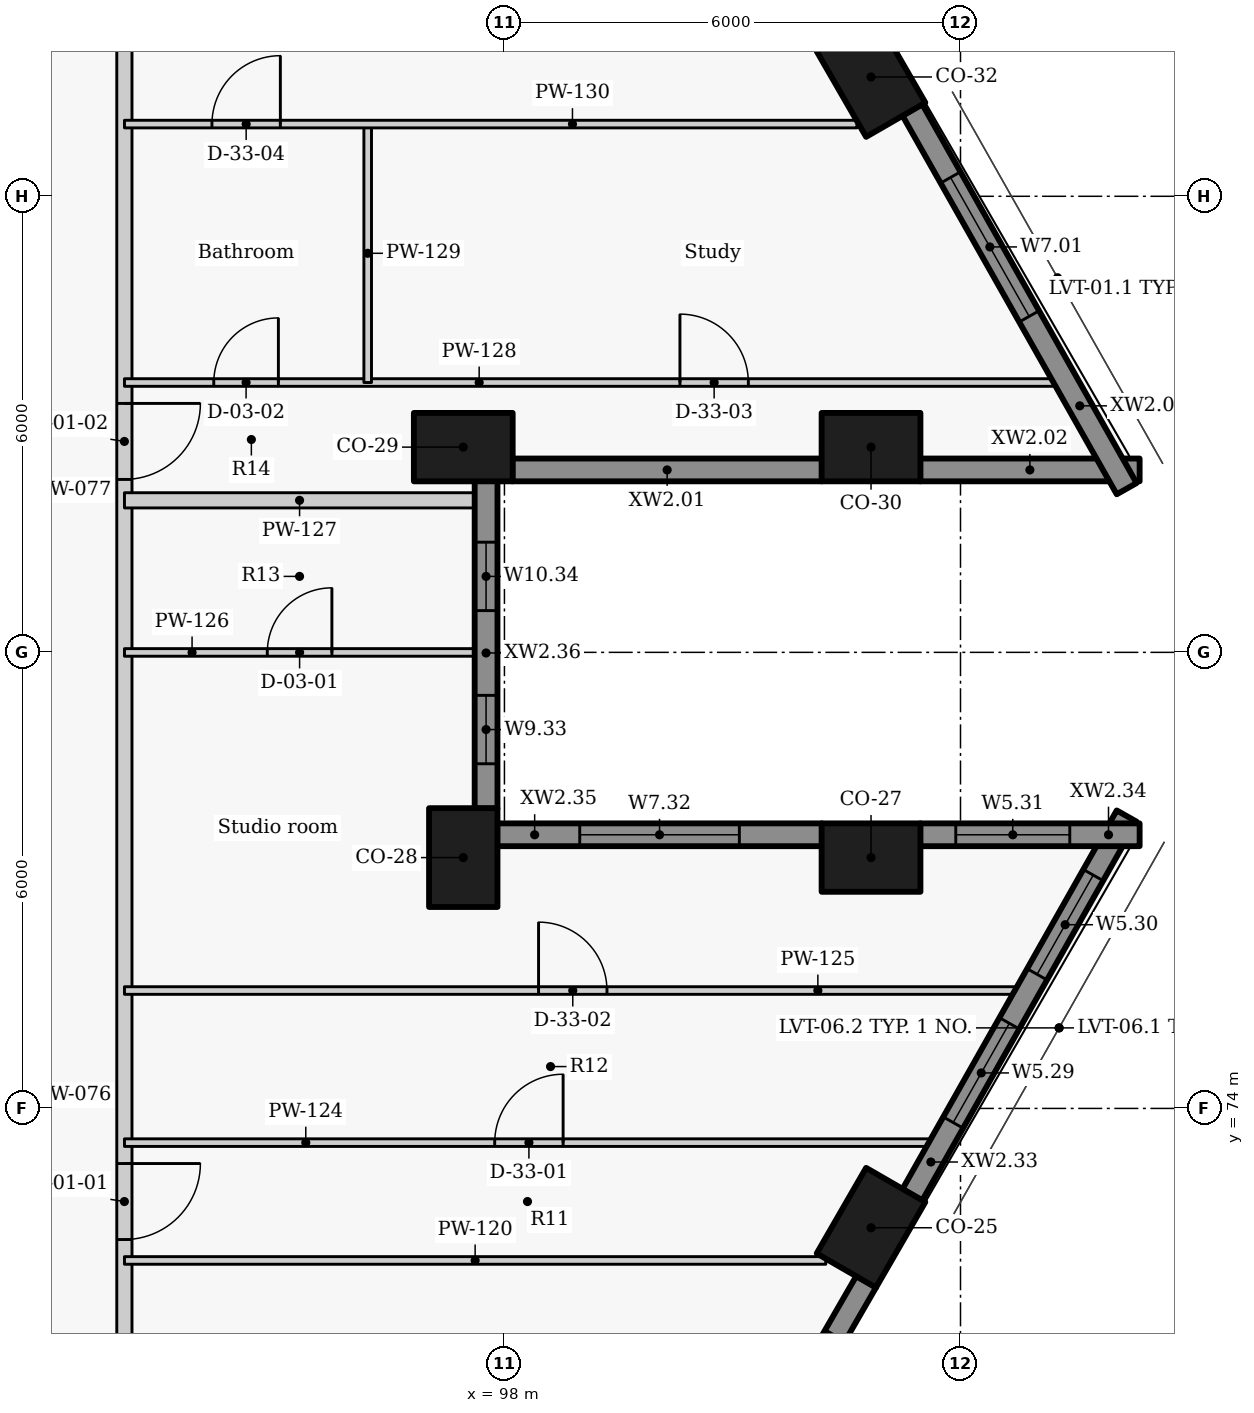
"""IFC4 building model, lengths in metres.
Left out: names, types, materials, properties, quantities, classifications, styles, units other than length and angle.
Written with IfcOpenShell. Run it as: python <this file> out.ifc"""

import sys

from ifc_helpers import new_model, si_unit, direction, frame, frame_2d, origin, origin_2d, place, context, subcontext, project, spatial, rectangle, extrude, element, fill, save


model = new_model("IFC4")
c1 = context("Model", 3, precision=1e-05, world=origin(), true_north=direction((0.0, 1.0)))
c2 = subcontext(c1, "Body", "Model", "MODEL_VIEW")
j1 = project(units=[si_unit("LENGTHUNIT", "METRE"), si_unit("PLANEANGLEUNIT", "RADIAN")], contexts=[c1])
p1 = place(None, origin())
s1 = spatial("IfcSite", under=j1, at=p1, CompositionType="ELEMENT")
p2 = place(p1, origin())
s2 = spatial("IfcBuilding", under=s1, at=p2, CompositionType="ELEMENT")
p3 = place(p2, frame((0.0, 0.0, 160.2)))
s3 = spatial("IfcBuildingStorey", under=s2, at=p3, CompositionType="ELEMENT", Elevation=160.2)
for number, where, z_axis, x_axis in (
    (1, (102.823, 72.43, 0.0), (0.0, 0.0, 1.0), (0.5, 0.866, 0.0)),
    (2, (102.823, 77.3, 0.0), (0.0, 0.0, 1.0), (-1.0, 0.0, 0.0)),
    (3, (97.458, 77.3, 0.0), (0.0, 0.0, 1.0), (0.0, 1.0, 0.0)),
    (4, (97.458, 82.7, 0.0), (0.0, 0.0, 1.0), (1.0, 0.0, 0.0)),
    (5, (102.823, 82.7, 0.0), (0.0, 0.0, 1.0), (1.0, 0.0, 0.0)),
    (6, (102.823, 87.57, 0.0), (0.0, 0.0, 1.0), (-0.5, 0.866, 0.0)),
):
    element("IfcColumn", number, at=place(p3, frame(where, z_axis=z_axis, x_axis=x_axis)), inside=s3, PredefinedType="COLUMN", context=c2, shape_type="SweptSolid", body=[
        extrude(rectangle(XDim=1.3, YDim=0.9, at=origin_2d()), origin(), (0.0, 0.0, 1.0), 3.3),
    ])
p4 = place(p3, frame((98.104, 82.4, 0.0), z_axis=(0.0, 0.0, 1.0), x_axis=(1.0, 0.0, 0.0)))
e7 = element("IfcWall", 7, at=p4, inside=s3, PredefinedType="SOLIDWALL", context=c2, shape_type="SweptSolid", body=[
    extrude(rectangle(XDim=4.073, YDim=0.3, at=frame_2d((2.036, 0.0))), origin(), (0.0, 0.0, 1.0), 2.425),
])
p5 = place(p3, frame((103.469, 82.4, 0.0), z_axis=(0.0, 0.0, 1.0), x_axis=(1.0, 0.0, 0.0)))
e8 = element("IfcWall", 8, at=p5, inside=s3, PredefinedType="SOLIDWALL", context=c2, shape_type="SweptSolid", body=[
    extrude(rectangle(XDim=2.888, YDim=0.3, at=frame_2d((1.444, 0.0))), origin(), (0.0, 0.0, 1.0), 2.425),
])
p6 = place(p3, frame((106.186, 82.153, 0.0), z_axis=(0.0, 0.0, 1.0), x_axis=(-0.492498306264, 0.87031340236, 0.0)))
e9 = element("IfcWall", 9, at=p6, inside=s3, PredefinedType="SOLIDWALL", context=c2, shape_type="SweptSolid", body=[
    extrude(rectangle(XDim=5.727, YDim=0.3, at=frame_2d((2.863, 0.0))), origin(), (0.0, 0.0, 1.0), 2.425),
])
p7 = place(p6, frame((2.604, 0.0, 0.9)))
e10 = element("IfcOpeningElement", 10, at=p7, cuts=e9, PredefinedType="OPENING", context=c2, shape_type="SweptSolid", body=[
    extrude(rectangle(XDim=2.1, YDim=1.1, at=frame_2d((1.05, 0.55))), frame((0.0, 0.16, 0.0), z_axis=(0.0, -1.0, 0.0), x_axis=(1.0, 0.0, 0.0)), (0.0, 0.0, 1.0), 0.32),
])
p8 = place(p3, frame((100.891, 68.485, 0.0), z_axis=(0.0, 0.0, 1.0), x_axis=(0.499933594891, 0.866063739398, 0.0)))
e11 = element("IfcWall", 11, at=p8, inside=s3, PredefinedType="SOLIDWALL", context=c2, shape_type="SweptSolid", body=[
    extrude(rectangle(XDim=3.737, YDim=0.3, at=frame_2d((1.868, 0.0))), origin(), (0.0, 0.0, 1.0), 2.425),
])
p9 = place(p8, frame((0.818, 0.0, 0.9)))
e12 = element("IfcOpeningElement", 12, at=p9, cuts=e11, PredefinedType="OPENING", context=c2, shape_type="SweptSolid", body=[
    extrude(rectangle(XDim=2.1, YDim=1.1, at=frame_2d((1.05, 0.55))), frame((0.0, 0.16, 0.0), z_axis=(0.0, -1.0, 0.0), x_axis=(1.0, 0.0, 0.0)), (0.0, 0.0, 1.0), 0.32),
])
p10 = place(p3, frame((103.366, 72.863, 0.0), z_axis=(0.0, 0.0, 1.0), x_axis=(0.492498306264, 0.87031340236, 0.0)))
e13 = element("IfcWall", 13, at=p10, inside=s3, PredefinedType="SOLIDWALL", context=c2, shape_type="SweptSolid", body=[
    extrude(rectangle(XDim=5.727, YDim=0.3, at=frame_2d((2.863, 0.0))), origin(), (0.0, 0.0, 1.0), 2.425),
])
p11 = place(p10, frame((1.093, 0.0, 0.9)))
e14 = element("IfcOpeningElement", 14, at=p11, cuts=e13, PredefinedType="OPENING", context=c2, shape_type="SweptSolid", body=[
    extrude(rectangle(XDim=1.5, YDim=1.1, at=frame_2d((0.75, 0.55))), frame((0.0, 0.16, 0.0), z_axis=(0.0, -1.0, 0.0), x_axis=(1.0, 0.0, 0.0)), (0.0, 0.0, 1.0), 0.32),
])
p12 = place(p10, frame((3.334, 0.0, 0.9)))
e15 = element("IfcOpeningElement", 15, at=p12, cuts=e13, PredefinedType="OPENING", context=c2, shape_type="SweptSolid", body=[
    extrude(rectangle(XDim=1.5, YDim=1.1, at=frame_2d((0.75, 0.55))), frame((0.0, 0.16, 0.0), z_axis=(0.0, -1.0, 0.0), x_axis=(1.0, 0.0, 0.0)), (0.0, 0.0, 1.0), 0.32),
])
p13 = place(p3, frame((106.357, 77.6, 0.0), z_axis=(0.0, 0.0, 1.0), x_axis=(-1.0, 0.0, 0.0)))
e16 = element("IfcWall", 16, at=p13, inside=s3, PredefinedType="SOLIDWALL", context=c2, shape_type="SweptSolid", body=[
    extrude(rectangle(XDim=2.888, YDim=0.3, at=frame_2d((1.444, 0.0))), origin(), (0.0, 0.0, 1.0), 2.425),
])
p14 = place(p13, frame((0.919, 0.0, 0.9)))
e17 = element("IfcOpeningElement", 17, at=p14, cuts=e16, PredefinedType="OPENING", context=c2, shape_type="SweptSolid", body=[
    extrude(rectangle(XDim=1.5, YDim=1.1, at=frame_2d((0.75, 0.55))), frame((0.0, 0.16, 0.0), z_axis=(0.0, -1.0, 0.0), x_axis=(1.0, 0.0, 0.0)), (0.0, 0.0, 1.0), 0.32),
])
p15 = place(p3, frame((102.177, 77.6, 0.0), z_axis=(0.0, 0.0, 1.0), x_axis=(-1.0, 0.0, 0.0)))
e18 = element("IfcWall", 18, at=p15, inside=s3, PredefinedType="SOLIDWALL", context=c2, shape_type="SweptSolid", body=[
    extrude(rectangle(XDim=4.273, YDim=0.3, at=frame_2d((2.136, 0.0))), origin(), (0.0, 0.0, 1.0), 2.425),
])
p16 = place(p15, frame((1.086, 0.0, 0.9)))
e19 = element("IfcOpeningElement", 19, at=p16, cuts=e18, PredefinedType="OPENING", context=c2, shape_type="SweptSolid", body=[
    extrude(rectangle(XDim=2.1, YDim=1.1, at=frame_2d((1.05, 0.55))), frame((0.0, 0.16, 0.0), z_axis=(0.0, -1.0, 0.0), x_axis=(1.0, 0.0, 0.0)), (0.0, 0.0, 1.0), 0.32),
])
p17 = place(p3, frame((97.758, 77.946, 0.0), z_axis=(0.0, 0.0, 1.0), x_axis=(0.0, 1.0, 0.0)))
e20 = element("IfcWall", 20, at=p17, inside=s3, PredefinedType="SOLIDWALL", context=c2, shape_type="SweptSolid", body=[
    extrude(rectangle(XDim=4.308, YDim=0.3, at=frame_2d((2.154, 0.0))), origin(), (0.0, 0.0, 1.0), 2.425),
])
p18 = place(p17, frame((0.588, 0.0, 0.9)))
e21 = element("IfcOpeningElement", 21, at=p18, cuts=e20, PredefinedType="OPENING", context=c2, shape_type="SweptSolid", body=[
    extrude(rectangle(XDim=0.9, YDim=1.1, at=frame_2d((0.45, 0.55))), frame((0.0, 0.16, 0.0), z_axis=(0.0, -1.0, 0.0), x_axis=(1.0, 0.0, 0.0)), (0.0, 0.0, 1.0), 0.32),
])
p19 = place(p17, frame((2.603, 0.0, 1.5)))
e22 = element("IfcOpeningElement", 22, at=p19, cuts=e20, PredefinedType="OPENING", context=c2, shape_type="SweptSolid", body=[
    extrude(rectangle(XDim=0.9, YDim=0.5, at=frame_2d((0.45, 0.25))), frame((0.0, 0.16, 0.0), z_axis=(0.0, -1.0, 0.0), x_axis=(1.0, 0.0, 0.0)), (0.0, 0.0, 1.0), 0.32),
])
p20 = place(p3, frame((93.0, 102.498, 0.0), z_axis=(0.0, 0.0, 1.0), x_axis=(0.0, -1.0, 0.0)))
e23 = element("IfcWall", 23, at=p20, inside=s3, PredefinedType="PARTITIONING", context=c2, shape_type="SweptSolid", body=[
    extrude(rectangle(XDim=45.665, YDim=0.2, at=frame_2d((22.833, 0.0))), origin(), (0.0, 0.0, 1.0), 2.405),
])
p21 = place(p20, frame((37.581, 0.0, 0.0)))
e24 = element("IfcOpeningElement", 24, at=p21, cuts=e23, PredefinedType="OPENING", context=c2, shape_type="SweptSolid", body=[
    extrude(rectangle(XDim=1.0, YDim=2.1, at=frame_2d((0.5, 1.05))), frame((0.0, 0.11, 0.0), z_axis=(0.0, -1.0, 0.0), x_axis=(1.0, 0.0, 0.0)), (0.0, 0.0, 1.0), 0.22),
])
p22 = place(p20, frame((29.223, 0.0, 0.0)))
e25 = element("IfcOpeningElement", 25, at=p22, cuts=e23, PredefinedType="OPENING", context=c2, shape_type="SweptSolid", body=[
    extrude(rectangle(XDim=1.0, YDim=2.1, at=frame_2d((0.5, 1.05))), frame((0.0, 0.11, 0.0), z_axis=(0.0, -1.0, 0.0), x_axis=(1.0, 0.0, 0.0)), (0.0, 0.0, 1.0), 0.22),
])
p23 = place(p20, frame((19.223, 0.0, 0.0)))
e26 = element("IfcOpeningElement", 26, at=p23, cuts=e23, PredefinedType="OPENING", context=c2, shape_type="SweptSolid", body=[
    extrude(rectangle(XDim=1.0, YDim=2.1, at=frame_2d((0.5, 1.05))), frame((0.0, 0.11, 0.0), z_axis=(0.0, -1.0, 0.0), x_axis=(1.0, 0.0, 0.0)), (0.0, 0.0, 1.0), 0.22),
])
p24 = place(p3, frame((93.001, 72.0, 0.0), z_axis=(0.0, 0.0, 1.0), x_axis=(1.0, 0.0, 0.0)))
e27 = element("IfcWall", 27, at=p24, inside=s3, PredefinedType="PARTITIONING", context=c2, shape_type="SweptSolid", body=[
    extrude(rectangle(XDim=9.227, YDim=0.1, at=frame_2d((4.614, 0.0))), origin(), (0.0, 0.0, 1.0), 3.025),
])
p25 = place(p3, frame((93.001, 73.55, 0.0), z_axis=(0.0, 0.0, 1.0), x_axis=(1.0, 0.0, 0.0)))
e28 = element("IfcWall", 28, at=p25, inside=s3, PredefinedType="PARTITIONING", context=c2, shape_type="SweptSolid", body=[
    extrude(rectangle(XDim=10.642, YDim=0.1, at=frame_2d((5.321, 0.0))), origin(), (0.0, 0.0, 1.0), 2.405),
])
p26 = place(p25, frame((4.871, 0.0, 0.0)))
e29 = element("IfcOpeningElement", 29, at=p26, cuts=e28, PredefinedType="OPENING", context=c2, shape_type="SweptSolid", body=[
    extrude(rectangle(XDim=0.9, YDim=2.1, at=frame_2d((0.45, 1.05))), frame((0.0, 0.06, 0.0), z_axis=(0.0, -1.0, 0.0), x_axis=(1.0, 0.0, 0.0)), (0.0, 0.0, 1.0), 0.12),
])
p27 = place(p3, frame((93.001, 75.551, 0.0), z_axis=(0.0, 0.0, 1.0), x_axis=(1.0, 0.0, 0.0)))
e30 = element("IfcWall", 30, at=p27, inside=s3, PredefinedType="PARTITIONING", context=c2, shape_type="SweptSolid", body=[
    extrude(rectangle(XDim=11.797, YDim=0.1, at=frame_2d((5.898, 0.0))), origin(), (0.0, 0.0, 1.0), 2.405),
])
p28 = place(p27, frame((5.448, 0.0, 0.0)))
e31 = element("IfcOpeningElement", 31, at=p28, cuts=e30, PredefinedType="OPENING", context=c2, shape_type="SweptSolid", body=[
    extrude(rectangle(XDim=0.9, YDim=2.1, at=frame_2d((0.45, 1.05))), frame((0.0, 0.06, 0.0), z_axis=(0.0, -1.0, 0.0), x_axis=(1.0, 0.0, 0.0)), (0.0, 0.0, 1.0), 0.12),
])
p29 = place(p3, frame((93.001, 79.999, 0.0), z_axis=(0.0, 0.0, 1.0), x_axis=(1.0, 0.0, 0.0)))
e32 = element("IfcWall", 32, at=p29, inside=s3, PredefinedType="PARTITIONING", context=c2, shape_type="SweptSolid", body=[
    extrude(rectangle(XDim=4.607, YDim=0.1, at=frame_2d((2.304, 0.0))), origin(), (0.0, 0.0, 1.0), 2.405),
])
p30 = place(p29, frame((1.879, 0.0, 0.0)))
e33 = element("IfcOpeningElement", 33, at=p30, cuts=e32, PredefinedType="OPENING", context=c2, shape_type="SweptSolid", body=[
    extrude(rectangle(XDim=0.85, YDim=2.1, at=frame_2d((0.425, 1.05))), frame((0.0, 0.06, 0.0), z_axis=(0.0, -1.0, 0.0), x_axis=(1.0, 0.0, 0.0)), (0.0, 0.0, 1.0), 0.12),
])
p31 = place(p3, frame((93.001, 82.0, 0.0), z_axis=(0.0, 0.0, 1.0), x_axis=(1.0, 0.0, 0.0)))
e34 = element("IfcWall", 34, at=p31, inside=s3, PredefinedType="PARTITIONING", context=c2, shape_type="SweptSolid", body=[
    extrude(rectangle(XDim=4.607, YDim=0.2, at=frame_2d((2.304, 0.0))), origin(), (0.0, 0.0, 1.0), 2.405),
])
p32 = place(p3, frame((93.001, 83.55, 0.0), z_axis=(0.0, 0.0, 1.0), x_axis=(1.0, 0.0, 0.0)))
e35 = element("IfcWall", 35, at=p32, inside=s3, PredefinedType="PARTITIONING", context=c2, shape_type="SweptSolid", body=[
    extrude(rectangle(XDim=12.316, YDim=0.1, at=frame_2d((6.158, 0.0))), origin(), (0.0, 0.0, 1.0), 2.405),
])
p33 = place(p32, frame((1.175, 0.0, 0.0)))
e36 = element("IfcOpeningElement", 36, at=p33, cuts=e35, PredefinedType="OPENING", context=c2, shape_type="SweptSolid", body=[
    extrude(rectangle(XDim=0.85, YDim=2.1, at=frame_2d((0.425, 1.05))), frame((0.0, 0.06, 0.0), z_axis=(0.0, -1.0, 0.0), x_axis=(1.0, 0.0, 0.0)), (0.0, 0.0, 1.0), 0.12),
])
p34 = place(p32, frame((7.308, 0.0, 0.0)))
e37 = element("IfcOpeningElement", 37, at=p34, cuts=e35, PredefinedType="OPENING", context=c2, shape_type="SweptSolid", body=[
    extrude(rectangle(XDim=0.9, YDim=2.1, at=frame_2d((0.45, 1.05))), frame((0.0, 0.06, 0.0), z_axis=(0.0, -1.0, 0.0), x_axis=(1.0, 0.0, 0.0)), (0.0, 0.0, 1.0), 0.12),
])
p35 = place(p3, frame((96.201, 83.55, 0.0), z_axis=(0.0, 0.0, 1.0), x_axis=(0.0, 1.0, 0.0)))
e38 = element("IfcWall", 38, at=p35, inside=s3, PredefinedType="PARTITIONING", context=c2, shape_type="SweptSolid", body=[
    extrude(rectangle(XDim=3.4, YDim=0.1, at=frame_2d((1.7, 0.0))), origin(), (0.0, 0.0, 1.0), 3.025),
])
p36 = place(p3, frame((93.001, 86.95, 0.0), z_axis=(0.0, 0.0, 1.0), x_axis=(1.0, 0.0, 0.0)))
e39 = element("IfcWall", 39, at=p36, inside=s3, PredefinedType="PARTITIONING", context=c2, shape_type="SweptSolid", body=[
    extrude(rectangle(XDim=9.637, YDim=0.1, at=frame_2d((4.818, 0.0))), origin(), (0.0, 0.0, 1.0), 3.025),
])
p37 = place(p36, frame((1.151, 0.0, 0.0)))
e40 = element("IfcOpeningElement", 40, at=p37, cuts=e39, PredefinedType="OPENING", context=c2, shape_type="SweptSolid", body=[
    extrude(rectangle(XDim=0.9, YDim=2.1, at=frame_2d((0.45, 1.05))), frame((0.0, 0.06, 0.0), z_axis=(0.0, -1.0, 0.0), x_axis=(1.0, 0.0, 0.0)), (0.0, 0.0, 1.0), 0.12),
])
p38 = place(p7, origin())
e41 = element("IfcWindow", 41, at=p38, inside=s3, PartitioningType="SINGLE_PANEL", PredefinedType="WINDOW", context=c2, shape_type="SweptSolid", body=[
    extrude(rectangle(XDim=2.1, YDim=1.1, at=frame_2d((1.05, 0.55))), frame((0.0, 0.03, 0.0), z_axis=(0.0, -1.0, 0.0), x_axis=(1.0, 0.0, 0.0)), (0.0, 0.0, 1.0), 0.06),
])
fill(e10, e41)
p39 = place(p11, origin())
e42 = element("IfcWindow", 42, at=p39, inside=s3, PartitioningType="SINGLE_PANEL", PredefinedType="WINDOW", context=c2, shape_type="SweptSolid", body=[
    extrude(rectangle(XDim=1.5, YDim=1.1, at=frame_2d((0.75, 0.55))), frame((0.0, 0.03, 0.0), z_axis=(0.0, -1.0, 0.0), x_axis=(1.0, 0.0, 0.0)), (0.0, 0.0, 1.0), 0.06),
])
fill(e14, e42)
p40 = place(p12, origin())
e43 = element("IfcWindow", 43, at=p40, inside=s3, PartitioningType="SINGLE_PANEL", PredefinedType="WINDOW", context=c2, shape_type="SweptSolid", body=[
    extrude(rectangle(XDim=1.5, YDim=1.1, at=frame_2d((0.75, 0.55))), frame((0.0, 0.03, 0.0), z_axis=(0.0, -1.0, 0.0), x_axis=(1.0, 0.0, 0.0)), (0.0, 0.0, 1.0), 0.06),
])
fill(e15, e43)
p41 = place(p14, origin())
e44 = element("IfcWindow", 44, at=p41, inside=s3, PartitioningType="SINGLE_PANEL", PredefinedType="WINDOW", context=c2, shape_type="SweptSolid", body=[
    extrude(rectangle(XDim=1.5, YDim=1.1, at=frame_2d((0.75, 0.55))), frame((0.0, 0.03, 0.0), z_axis=(0.0, -1.0, 0.0), x_axis=(1.0, 0.0, 0.0)), (0.0, 0.0, 1.0), 0.06),
])
fill(e17, e44)
p42 = place(p16, origin())
e45 = element("IfcWindow", 45, at=p42, inside=s3, PartitioningType="SINGLE_PANEL", PredefinedType="WINDOW", context=c2, shape_type="SweptSolid", body=[
    extrude(rectangle(XDim=2.1, YDim=1.1, at=frame_2d((1.05, 0.55))), frame((0.0, 0.03, 0.0), z_axis=(0.0, -1.0, 0.0), x_axis=(1.0, 0.0, 0.0)), (0.0, 0.0, 1.0), 0.06),
])
fill(e19, e45)
p43 = place(p18, origin())
e46 = element("IfcWindow", 46, at=p43, inside=s3, PartitioningType="SINGLE_PANEL", PredefinedType="WINDOW", context=c2, shape_type="SweptSolid", body=[
    extrude(rectangle(XDim=0.9, YDim=1.1, at=frame_2d((0.45, 0.55))), frame((0.0, 0.03, 0.0), z_axis=(0.0, -1.0, 0.0), x_axis=(1.0, 0.0, 0.0)), (0.0, 0.0, 1.0), 0.06),
])
fill(e21, e46)
p44 = place(p19, origin())
e47 = element("IfcWindow", 47, at=p44, inside=s3, PartitioningType="SINGLE_PANEL", PredefinedType="WINDOW", context=c2, shape_type="SweptSolid", body=[
    extrude(rectangle(XDim=0.9, YDim=0.5, at=frame_2d((0.45, 0.25))), frame((0.0, 0.03, 0.0), z_axis=(0.0, -1.0, 0.0), x_axis=(1.0, 0.0, 0.0)), (0.0, 0.0, 1.0), 0.06),
])
fill(e22, e47)
p45 = place(p22, origin())
e48 = element("IfcDoor", 48, at=p45, inside=s3, OperationType="SINGLE_SWING_LEFT", PredefinedType="DOOR", context=c2, shape_type="SweptSolid", body=[
    extrude(rectangle(XDim=1.0, YDim=2.1, at=frame_2d((0.5, 1.05))), frame((0.0, 0.025, 0.0), z_axis=(0.0, -1.0, 0.0), x_axis=(1.0, 0.0, 0.0)), (0.0, 0.0, 1.0), 0.05),
])
fill(e25, e48)
p46 = place(p26, origin())
e49 = element("IfcDoor", 49, at=p46, inside=s3, OperationType="SINGLE_SWING_RIGHT", PredefinedType="DOOR", context=c2, shape_type="SweptSolid", body=[
    extrude(rectangle(XDim=0.9, YDim=2.1, at=frame_2d((0.45, 1.05))), frame((0.0, 0.025, 0.0), z_axis=(0.0, -1.0, 0.0), x_axis=(1.0, 0.0, 0.0)), (0.0, 0.0, 1.0), 0.05),
])
fill(e29, e49)
p47 = place(p28, origin())
e50 = element("IfcDoor", 50, at=p47, inside=s3, OperationType="SINGLE_SWING_LEFT", PredefinedType="DOOR", context=c2, shape_type="SweptSolid", body=[
    extrude(rectangle(XDim=0.9, YDim=2.1, at=frame_2d((0.45, 1.05))), frame((0.0, 0.025, 0.0), z_axis=(0.0, -1.0, 0.0), x_axis=(1.0, 0.0, 0.0)), (0.0, 0.0, 1.0), 0.05),
])
fill(e31, e50)
p48 = place(p30, origin())
e51 = element("IfcDoor", 51, at=p48, inside=s3, OperationType="SINGLE_SWING_RIGHT", PredefinedType="DOOR", context=c2, shape_type="SweptSolid", body=[
    extrude(rectangle(XDim=0.85, YDim=2.1, at=frame_2d((0.425, 1.05))), frame((0.0, 0.025, 0.0), z_axis=(0.0, -1.0, 0.0), x_axis=(1.0, 0.0, 0.0)), (0.0, 0.0, 1.0), 0.05),
])
fill(e33, e51)
p49 = place(p23, origin())
e52 = element("IfcDoor", 52, at=p49, inside=s3, OperationType="SINGLE_SWING_LEFT", PredefinedType="DOOR", context=c2, shape_type="SweptSolid", body=[
    extrude(rectangle(XDim=1.0, YDim=2.1, at=frame_2d((0.5, 1.05))), frame((0.0, 0.025, 0.0), z_axis=(0.0, -1.0, 0.0), x_axis=(1.0, 0.0, 0.0)), (0.0, 0.0, 1.0), 0.05),
])
fill(e26, e52)
p50 = place(p33, origin())
e53 = element("IfcDoor", 53, at=p50, inside=s3, OperationType="SINGLE_SWING_RIGHT", PredefinedType="DOOR", context=c2, shape_type="SweptSolid", body=[
    extrude(rectangle(XDim=0.85, YDim=2.1, at=frame_2d((0.425, 1.05))), frame((0.0, 0.025, 0.0), z_axis=(0.0, -1.0, 0.0), x_axis=(1.0, 0.0, 0.0)), (0.0, 0.0, 1.0), 0.05),
])
fill(e36, e53)
p51 = place(p34, origin())
e54 = element("IfcDoor", 54, at=p51, inside=s3, OperationType="SINGLE_SWING_LEFT", PredefinedType="DOOR", context=c2, shape_type="SweptSolid", body=[
    extrude(rectangle(XDim=0.9, YDim=2.1, at=frame_2d((0.45, 1.05))), frame((0.0, 0.025, 0.0), z_axis=(0.0, -1.0, 0.0), x_axis=(1.0, 0.0, 0.0)), (0.0, 0.0, 1.0), 0.05),
])
fill(e37, e54)
p52 = place(p37, origin())
e55 = element("IfcDoor", 55, at=p52, inside=s3, OperationType="SINGLE_SWING_RIGHT", PredefinedType="DOOR", context=c2, shape_type="SweptSolid", body=[
    extrude(rectangle(XDim=0.9, YDim=2.1, at=frame_2d((0.45, 1.05))), frame((0.0, 0.025, 0.0), z_axis=(0.0, -1.0, 0.0), x_axis=(1.0, 0.0, 0.0)), (0.0, 0.0, 1.0), 0.05),
])
fill(e40, e55)
save(model, sys.argv[1])
